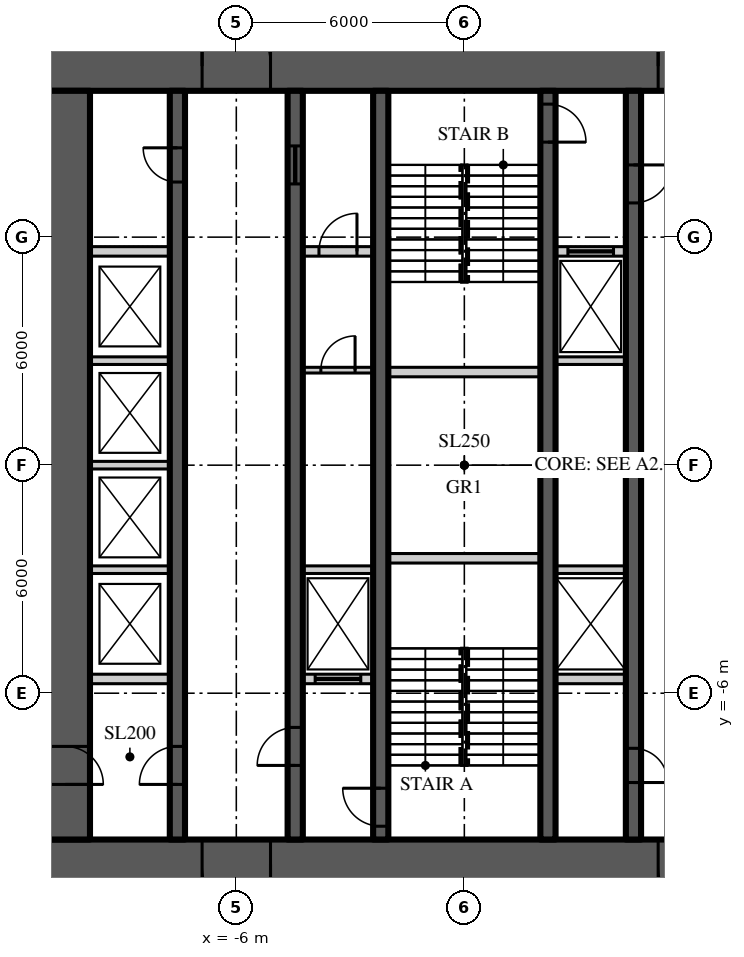
"""IFC4 building model, lengths in metres.
Left out: names, types, materials, properties, quantities, classifications, styles, units other than length and angle.
Written with IfcOpenShell. Run it as: python <this file> out.ifc"""

import sys

from ifc_helpers import new_model, si_unit, direction, frame, frame_2d, origin, place, context, subcontext, project, spatial, rectangle, extrude, element, fill, save


model = new_model("IFC4")
c1 = context("Model", 3, precision=1e-05, world=origin(), true_north=direction((0.0, 1.0)))
c2 = subcontext(c1, "Body", "Model", "MODEL_VIEW")
j1 = project(units=[si_unit("LENGTHUNIT", "METRE"), si_unit("PLANEANGLEUNIT", "RADIAN")], contexts=[c1])
p1 = place(None, origin())
s1 = spatial("IfcSite", under=j1, at=p1, CompositionType="ELEMENT")
p2 = place(p1, origin())
s2 = spatial("IfcBuilding", under=s1, at=p2, CompositionType="ELEMENT")
p3 = place(p2, frame((0.0, 0.0, 7.0)))
s3 = spatial("IfcBuildingStorey", under=s2, at=p3, CompositionType="ELEMENT", Elevation=7.0)
p4 = place(p3, frame((-11.15, 10.5, 0.0), z_axis=(0.0, 0.0, 1.0), x_axis=(1.0, 0.0, 0.0)))
e1 = element("IfcWall", 1, at=p4, inside=s3, PredefinedType="SHEAR", context=c2, shape_type="SweptSolid", body=[
    extrude(rectangle(XDim=22.3, YDim=1.3, at=frame_2d((11.15, 0.0))), origin(), (0.0, 0.0, 1.0), 8.0),
])
p5 = place(p4, frame((4.25, 0.0, 0.0)))
e2 = element("IfcOpeningElement", 2, at=p5, cuts=e1, PredefinedType="OPENING", context=c2, shape_type="SweptSolid", body=[
    extrude(rectangle(XDim=1.8, YDim=2.2, at=frame_2d((0.9, 1.1))), frame((0.0, 0.66, 0.0), z_axis=(0.0, -1.0, 0.0), x_axis=(1.0, 0.0, 0.0)), (0.0, 0.0, 1.0), 1.32),
])
p6 = place(p4, frame((16.25, 0.0, 0.0)))
e3 = element("IfcOpeningElement", 3, at=p6, cuts=e1, PredefinedType="OPENING", context=c2, shape_type="SweptSolid", body=[
    extrude(rectangle(XDim=1.8, YDim=2.2, at=frame_2d((0.9, 1.1))), frame((0.0, 0.66, 0.0), z_axis=(0.0, -1.0, 0.0), x_axis=(1.0, 0.0, 0.0)), (0.0, 0.0, 1.0), 1.32),
])
p7 = place(p3, frame((11.15, -10.5, 0.0), z_axis=(0.0, 0.0, 1.0), x_axis=(-1.0, 0.0, 0.0)))
e4 = element("IfcWall", 4, at=p7, inside=s3, PredefinedType="SHEAR", context=c2, shape_type="SweptSolid", body=[
    extrude(rectangle(XDim=22.3, YDim=1.3, at=frame_2d((11.15, 0.0))), origin(), (0.0, 0.0, 1.0), 8.0),
])
p8 = place(p7, frame((16.25, 0.0, 0.0)))
e5 = element("IfcOpeningElement", 5, at=p8, cuts=e4, PredefinedType="OPENING", context=c2, shape_type="SweptSolid", body=[
    extrude(rectangle(XDim=1.8, YDim=2.2, at=frame_2d((0.9, 1.1))), frame((0.0, 0.66, 0.0), z_axis=(0.0, -1.0, 0.0), x_axis=(1.0, 0.0, 0.0)), (0.0, 0.0, 1.0), 1.32),
])
p9 = place(p7, frame((4.25, 0.0, 0.0)))
e6 = element("IfcOpeningElement", 6, at=p9, cuts=e4, PredefinedType="OPENING", context=c2, shape_type="SweptSolid", body=[
    extrude(rectangle(XDim=1.8, YDim=2.2, at=frame_2d((0.9, 1.1))), frame((0.0, 0.66, 0.0), z_axis=(0.0, -1.0, 0.0), x_axis=(1.0, 0.0, 0.0)), (0.0, 0.0, 1.0), 1.32),
])
p10 = place(p3, frame((-10.5, 9.85, 0.0), z_axis=(0.0, 0.0, 1.0), x_axis=(0.0, -1.0, 0.0)))
e7 = element("IfcWall", 7, at=p10, inside=s3, PredefinedType="SHEAR", context=c2, shape_type="SweptSolid", body=[
    extrude(rectangle(XDim=19.7, YDim=1.3, at=frame_2d((9.85, 0.0))), origin(), (0.0, 0.0, 1.0), 8.0),
])
p11 = place(p10, frame((17.25, 0.0, 0.0)))
e8 = element("IfcOpeningElement", 8, at=p11, cuts=e7, PredefinedType="OPENING", context=c2, shape_type="SweptSolid", body=[
    extrude(rectangle(XDim=1.0, YDim=2.2, at=frame_2d((0.5, 1.1))), frame((0.0, 0.66, 0.0), z_axis=(0.0, -1.0, 0.0), x_axis=(1.0, 0.0, 0.0)), (0.0, 0.0, 1.0), 1.32),
])
p12 = place(p3, frame((-7.55, -9.85, 0.0), z_axis=(0.0, 0.0, 1.0), x_axis=(0.0, 1.0, 0.0)))
e9 = element("IfcWall", 9, at=p12, inside=s3, PredefinedType="SHEAR", context=c2, shape_type="SweptSolid", body=[
    extrude(rectangle(XDim=19.7, YDim=0.4, at=frame_2d((9.85, 0.0))), origin(), (0.0, 0.0, 1.0), 8.0),
])
p13 = place(p12, frame((1.45, 0.0, 0.0)))
e10 = element("IfcOpeningElement", 10, at=p13, cuts=e9, PredefinedType="OPENING", context=c2, shape_type="SweptSolid", body=[
    extrude(rectangle(XDim=1.0, YDim=2.2, at=frame_2d((0.5, 1.1))), frame((0.0, 0.21, 0.0), z_axis=(0.0, -1.0, 0.0), x_axis=(1.0, 0.0, 0.0)), (0.0, 0.0, 1.0), 0.42),
])
p14 = place(p12, frame((17.3, 0.0, 0.0)))
e11 = element("IfcOpeningElement", 11, at=p14, cuts=e9, PredefinedType="OPENING", context=c2, shape_type="SweptSolid", body=[
    extrude(rectangle(XDim=0.9, YDim=2.1, at=frame_2d((0.45, 1.05))), frame((0.0, 0.21, 0.0), z_axis=(0.0, -1.0, 0.0), x_axis=(1.0, 0.0, 0.0)), (0.0, 0.0, 1.0), 0.42),
])
p15 = place(p3, frame((-4.45, -9.85, 0.0), z_axis=(0.0, 0.0, 1.0), x_axis=(0.0, 1.0, 0.0)))
e12 = element("IfcWall", 12, at=p15, inside=s3, PredefinedType="SHEAR", context=c2, shape_type="SweptSolid", body=[
    extrude(rectangle(XDim=19.7, YDim=0.4, at=frame_2d((9.85, 0.0))), origin(), (0.0, 0.0, 1.0), 8.0),
])
p16 = place(p15, frame((1.95, 0.0, 0.0)))
e13 = element("IfcOpeningElement", 13, at=p16, cuts=e12, PredefinedType="OPENING", context=c2, shape_type="SweptSolid", body=[
    extrude(rectangle(XDim=1.0, YDim=2.2, at=frame_2d((0.5, 1.1))), frame((0.0, 0.21, 0.0), z_axis=(0.0, -1.0, 0.0), x_axis=(1.0, 0.0, 0.0)), (0.0, 0.0, 1.0), 0.42),
])
p17 = place(p15, frame((17.25, 0.0, 0.0)))
e14 = element("IfcOpeningElement", 14, at=p17, cuts=e12, PredefinedType="OPENING", context=c2, shape_type="SweptSolid", body=[
    extrude(rectangle(XDim=1.0, YDim=2.1, at=frame_2d((0.5, 1.05))), frame((0.0, 0.21, 0.0), z_axis=(0.0, -1.0, 0.0), x_axis=(1.0, 0.0, 0.0)), (0.0, 0.0, 1.0), 0.42),
])
p18 = place(p3, frame((4.45, 9.85, 0.0), z_axis=(0.0, 0.0, 1.0), x_axis=(0.0, -1.0, 0.0)))
e15 = element("IfcWall", 15, at=p18, inside=s3, PredefinedType="SHEAR", context=c2, shape_type="SweptSolid", body=[
    extrude(rectangle(XDim=19.7, YDim=0.4, at=frame_2d((9.85, 0.0))), origin(), (0.0, 0.0, 1.0), 8.0),
])
p19 = place(p18, frame((1.95, 0.0, 0.0)))
e16 = element("IfcOpeningElement", 16, at=p19, cuts=e15, PredefinedType="OPENING", context=c2, shape_type="SweptSolid", body=[
    extrude(rectangle(XDim=1.0, YDim=2.2, at=frame_2d((0.5, 1.1))), frame((0.0, 0.21, 0.0), z_axis=(0.0, -1.0, 0.0), x_axis=(1.0, 0.0, 0.0)), (0.0, 0.0, 1.0), 0.42),
])
p20 = place(p18, frame((17.3, 0.0, 0.0)))
e17 = element("IfcOpeningElement", 17, at=p20, cuts=e15, PredefinedType="OPENING", context=c2, shape_type="SweptSolid", body=[
    extrude(rectangle(XDim=0.9, YDim=2.1, at=frame_2d((0.45, 1.05))), frame((0.0, 0.21, 0.0), z_axis=(0.0, -1.0, 0.0), x_axis=(1.0, 0.0, 0.0)), (0.0, 0.0, 1.0), 0.42),
])
p21 = place(p3, frame((-2.2, -9.85, 0.0), z_axis=(0.0, 0.0, 1.0), x_axis=(0.0, 1.0, 0.0)))
e18 = element("IfcWall", 18, at=p21, inside=s3, PredefinedType="SHEAR", context=c2, shape_type="SweptSolid", body=[
    extrude(rectangle(XDim=19.7, YDim=0.4, at=frame_2d((9.85, 0.0))), origin(), (0.0, 0.0, 1.0), 8.0),
])
p22 = place(p21, frame((0.35, 0.0, 0.0)))
e19 = element("IfcOpeningElement", 19, at=p22, cuts=e18, PredefinedType="OPENING", context=c2, shape_type="SweptSolid", body=[
    extrude(rectangle(XDim=1.0, YDim=2.2, at=frame_2d((0.5, 1.1))), frame((0.0, 0.21, 0.0), z_axis=(0.0, -1.0, 0.0), x_axis=(1.0, 0.0, 0.0)), (0.0, 0.0, 1.0), 0.42),
])
p23 = place(p3, frame((2.2, 9.85, 0.0), z_axis=(0.0, 0.0, 1.0), x_axis=(0.0, -1.0, 0.0)))
e20 = element("IfcWall", 20, at=p23, inside=s3, PredefinedType="SHEAR", context=c2, shape_type="SweptSolid", body=[
    extrude(rectangle(XDim=19.7, YDim=0.4, at=frame_2d((9.85, 0.0))), origin(), (0.0, 0.0, 1.0), 8.0),
])
p24 = place(p23, frame((0.35, 0.0, 0.0)))
e21 = element("IfcOpeningElement", 21, at=p24, cuts=e20, PredefinedType="OPENING", context=c2, shape_type="SweptSolid", body=[
    extrude(rectangle(XDim=1.0, YDim=2.2, at=frame_2d((0.5, 1.1))), frame((0.0, 0.21, 0.0), z_axis=(0.0, -1.0, 0.0), x_axis=(1.0, 0.0, 0.0)), (0.0, 0.0, 1.0), 0.42),
])
p25 = place(p3, frame((-9.85, 5.625, 0.0), z_axis=(0.0, 0.0, 1.0), x_axis=(1.0, 0.0, 0.0)))
e22 = element("IfcWall", 22, at=p25, inside=s3, PredefinedType="SOLIDWALL", context=c2, shape_type="SweptSolid", body=[
    extrude(rectangle(XDim=2.1, YDim=0.25, at=frame_2d((1.05, 0.0))), origin(), (0.0, 0.0, 1.0), 7.8),
])
p26 = place(p3, frame((-4.25, 5.625, 0.0), z_axis=(0.0, 0.0, 1.0), x_axis=(1.0, 0.0, 0.0)))
e23 = element("IfcWall", 23, at=p26, inside=s3, PredefinedType="SOLIDWALL", context=c2, shape_type="SweptSolid", body=[
    extrude(rectangle(XDim=1.85, YDim=0.25, at=frame_2d((0.925, 0.0))), origin(), (0.0, 0.0, 1.0), 7.8),
])
p27 = place(p26, frame((0.425, 0.0, 0.0)))
e24 = element("IfcOpeningElement", 24, at=p27, cuts=e23, PredefinedType="OPENING", context=c2, shape_type="SweptSolid", body=[
    extrude(rectangle(XDim=1.0, YDim=2.2, at=frame_2d((0.5, 1.1))), frame((0.0, 0.135, 0.0), z_axis=(0.0, -1.0, 0.0), x_axis=(1.0, 0.0, 0.0)), (0.0, 0.0, 1.0), 0.27),
])
p28 = place(p3, frame((2.4, 5.625, 0.0), z_axis=(0.0, 0.0, 1.0), x_axis=(1.0, 0.0, 0.0)))
e25 = element("IfcWall", 25, at=p28, inside=s3, PredefinedType="SOLIDWALL", context=c2, shape_type="SweptSolid", body=[
    extrude(rectangle(XDim=1.85, YDim=0.25, at=frame_2d((0.925, 0.0))), origin(), (0.0, 0.0, 1.0), 7.8),
])
p29 = place(p28, frame((0.325, 0.0, 0.0)))
e26 = element("IfcOpeningElement", 26, at=p29, cuts=e25, PredefinedType="OPENING", context=c2, shape_type="SweptSolid", body=[
    extrude(rectangle(XDim=1.2, YDim=2.2, at=frame_2d((0.6, 1.1))), frame((0.0, 0.135, 0.0), z_axis=(0.0, -1.0, 0.0), x_axis=(1.0, 0.0, 0.0)), (0.0, 0.0, 1.0), 0.27),
])
p30 = place(p3, frame((-9.85, -5.625, 0.0), z_axis=(0.0, 0.0, 1.0), x_axis=(1.0, 0.0, 0.0)))
e27 = element("IfcWall", 27, at=p30, inside=s3, PredefinedType="SOLIDWALL", context=c2, shape_type="SweptSolid", body=[
    extrude(rectangle(XDim=2.1, YDim=0.25, at=frame_2d((1.05, 0.0))), origin(), (0.0, 0.0, 1.0), 7.8),
])
p31 = place(p3, frame((-4.25, -5.625, 0.0), z_axis=(0.0, 0.0, 1.0), x_axis=(1.0, 0.0, 0.0)))
e28 = element("IfcWall", 28, at=p31, inside=s3, PredefinedType="SOLIDWALL", context=c2, shape_type="SweptSolid", body=[
    extrude(rectangle(XDim=1.85, YDim=0.25, at=frame_2d((0.925, 0.0))), origin(), (0.0, 0.0, 1.0), 7.8),
])
p32 = place(p31, frame((0.325, 0.0, 0.0)))
e29 = element("IfcOpeningElement", 29, at=p32, cuts=e28, PredefinedType="OPENING", context=c2, shape_type="SweptSolid", body=[
    extrude(rectangle(XDim=1.2, YDim=2.2, at=frame_2d((0.6, 1.1))), frame((0.0, 0.135, 0.0), z_axis=(0.0, -1.0, 0.0), x_axis=(1.0, 0.0, 0.0)), (0.0, 0.0, 1.0), 0.27),
])
p33 = place(p3, frame((2.4, -5.625, 0.0), z_axis=(0.0, 0.0, 1.0), x_axis=(1.0, 0.0, 0.0)))
e30 = element("IfcWall", 30, at=p33, inside=s3, PredefinedType="SOLIDWALL", context=c2, shape_type="SweptSolid", body=[
    extrude(rectangle(XDim=1.85, YDim=0.25, at=frame_2d((0.925, 0.0))), origin(), (0.0, 0.0, 1.0), 7.8),
])
for number, where, z_axis, x_axis in (
    (31, (-2.0, -2.45, 0.0), (0.0, 0.0, 1.0), (1.0, 0.0, 0.0)),
    (32, (-2.0, 2.45, 0.0), (0.0, 0.0, 1.0), (1.0, 0.0, 0.0)),
):
    element("IfcWall", number, at=place(p3, frame(where, z_axis=z_axis, x_axis=x_axis)), inside=s3, PredefinedType="SOLIDWALL", context=c2, shape_type="SweptSolid", body=[
        extrude(rectangle(XDim=4.0, YDim=0.25, at=frame_2d((2.0, 0.0))), origin(), (0.0, 0.0, 1.0), 7.8),
    ])
p34 = place(p3, frame((-9.85, -2.75, 0.0), z_axis=(0.0, 0.0, 1.0), x_axis=(1.0, 0.0, 0.0)))
e33 = element("IfcWall", 33, at=p34, inside=s3, PredefinedType="SOLIDWALL", context=c2, shape_type="SweptSolid", body=[
    extrude(rectangle(XDim=2.1, YDim=0.2, at=frame_2d((1.05, 0.0))), origin(), (0.0, 0.0, 1.0), 7.8),
])
for number, where, z_axis, x_axis in (
    (34, (-4.25, -2.75, 0.0), (0.0, 0.0, 1.0), (1.0, 0.0, 0.0)),
    (35, (2.4, -2.75, 0.0), (0.0, 0.0, 1.0), (1.0, 0.0, 0.0)),
):
    element("IfcWall", number, at=place(p3, frame(where, z_axis=z_axis, x_axis=x_axis)), inside=s3, PredefinedType="SOLIDWALL", context=c2, shape_type="SweptSolid", body=[
        extrude(rectangle(XDim=1.85, YDim=0.2, at=frame_2d((0.925, 0.0))), origin(), (0.0, 0.0, 1.0), 7.8),
    ])
for number, where, z_axis, x_axis in (
    (36, (-9.85, 0.0, 0.0), (0.0, 0.0, 1.0), (1.0, 0.0, 0.0)),
    (37, (-9.85, 2.75, 0.0), (0.0, 0.0, 1.0), (1.0, 0.0, 0.0)),
):
    element("IfcWall", number, at=place(p3, frame(where, z_axis=z_axis, x_axis=x_axis)), inside=s3, PredefinedType="SOLIDWALL", context=c2, shape_type="SweptSolid", body=[
        extrude(rectangle(XDim=2.1, YDim=0.2, at=frame_2d((1.05, 0.0))), origin(), (0.0, 0.0, 1.0), 7.8),
    ])
p35 = place(p3, frame((2.4, 2.75, 0.0), z_axis=(0.0, 0.0, 1.0), x_axis=(1.0, 0.0, 0.0)))
e38 = element("IfcWall", 38, at=p35, inside=s3, PredefinedType="SOLIDWALL", context=c2, shape_type="SweptSolid", body=[
    extrude(rectangle(XDim=1.85, YDim=0.2, at=frame_2d((0.925, 0.0))), origin(), (0.0, 0.0, 1.0), 7.8),
])
p36 = place(p3, frame((-4.25, 2.5, 0.0), z_axis=(0.0, 0.0, 1.0), x_axis=(1.0, 0.0, 0.0)))
e39 = element("IfcWall", 39, at=p36, inside=s3, PredefinedType="SOLIDWALL", context=c2, shape_type="SweptSolid", body=[
    extrude(rectangle(XDim=1.85, YDim=0.15, at=frame_2d((0.925, 0.0))), origin(), (0.0, 0.0, 1.0), 7.75),
])
p37 = place(p36, frame((0.475, 0.0, 0.0)))
e40 = element("IfcOpeningElement", 40, at=p37, cuts=e39, PredefinedType="OPENING", context=c2, shape_type="SweptSolid", body=[
    extrude(rectangle(XDim=0.9, YDim=2.1, at=frame_2d((0.45, 1.05))), frame((0.0, 0.085, 0.0), z_axis=(0.0, -1.0, 0.0), x_axis=(1.0, 0.0, 0.0)), (0.0, 0.0, 1.0), 0.17),
])
p38 = place(p5, origin())
e41 = element("IfcDoor", 41, at=p38, inside=s3, OperationType="DOUBLE_DOOR_DOUBLE_SWING", PredefinedType="DOOR", context=c2, shape_type="SweptSolid", body=[
    extrude(rectangle(XDim=1.8, YDim=2.2, at=frame_2d((0.9, 1.1))), frame((0.0, 0.025, 0.0), z_axis=(0.0, -1.0, 0.0), x_axis=(1.0, 0.0, 0.0)), (0.0, 0.0, 1.0), 0.05),
])
fill(e2, e41)
p39 = place(p8, origin())
e42 = element("IfcDoor", 42, at=p39, inside=s3, OperationType="DOUBLE_DOOR_DOUBLE_SWING", PredefinedType="DOOR", context=c2, shape_type="SweptSolid", body=[
    extrude(rectangle(XDim=1.8, YDim=2.2, at=frame_2d((0.9, 1.1))), frame((0.0, 0.025, 0.0), z_axis=(0.0, -1.0, 0.0), x_axis=(1.0, 0.0, 0.0)), (0.0, 0.0, 1.0), 0.05),
])
fill(e5, e42)
p40 = place(p6, origin())
e43 = element("IfcDoor", 43, at=p40, inside=s3, OperationType="DOUBLE_DOOR_DOUBLE_SWING", PredefinedType="DOOR", context=c2, shape_type="SweptSolid", body=[
    extrude(rectangle(XDim=1.8, YDim=2.2, at=frame_2d((0.9, 1.1))), frame((0.0, 0.025, 0.0), z_axis=(0.0, -1.0, 0.0), x_axis=(1.0, 0.0, 0.0)), (0.0, 0.0, 1.0), 0.05),
])
fill(e3, e43)
p41 = place(p9, origin())
e44 = element("IfcDoor", 44, at=p41, inside=s3, OperationType="DOUBLE_DOOR_DOUBLE_SWING", PredefinedType="DOOR", context=c2, shape_type="SweptSolid", body=[
    extrude(rectangle(XDim=1.8, YDim=2.2, at=frame_2d((0.9, 1.1))), frame((0.0, 0.025, 0.0), z_axis=(0.0, -1.0, 0.0), x_axis=(1.0, 0.0, 0.0)), (0.0, 0.0, 1.0), 0.05),
])
fill(e6, e44)
p42 = place(p13, origin())
e45 = element("IfcDoor", 45, at=p42, inside=s3, OperationType="SINGLE_SWING_LEFT", PredefinedType="DOOR", context=c2, shape_type="SweptSolid", body=[
    extrude(rectangle(XDim=1.0, YDim=2.2, at=frame_2d((0.5, 1.1))), frame((0.0, 0.025, 0.0), z_axis=(0.0, -1.0, 0.0), x_axis=(1.0, 0.0, 0.0)), (0.0, 0.0, 1.0), 0.05),
])
fill(e10, e45)
p43 = place(p11, origin())
e46 = element("IfcDoor", 46, at=p43, inside=s3, OperationType="SINGLE_SWING_RIGHT", PredefinedType="DOOR", context=c2, shape_type="SweptSolid", body=[
    extrude(rectangle(XDim=1.0, YDim=2.2, at=frame_2d((0.5, 1.1))), frame((0.0, 0.025, 0.0), z_axis=(0.0, -1.0, 0.0), x_axis=(1.0, 0.0, 0.0)), (0.0, 0.0, 1.0), 0.05),
])
fill(e8, e46)
p44 = place(p16, origin())
e47 = element("IfcDoor", 47, at=p44, inside=s3, OperationType="SINGLE_SWING_LEFT", PredefinedType="DOOR", context=c2, shape_type="SweptSolid", body=[
    extrude(rectangle(XDim=1.0, YDim=2.2, at=frame_2d((0.5, 1.1))), frame((0.0, 0.025, 0.0), z_axis=(0.0, -1.0, 0.0), x_axis=(1.0, 0.0, 0.0)), (0.0, 0.0, 1.0), 0.05),
])
fill(e13, e47)
p45 = place(p22, origin())
e48 = element("IfcDoor", 48, at=p45, inside=s3, OperationType="SINGLE_SWING_RIGHT", PredefinedType="DOOR", context=c2, shape_type="SweptSolid", body=[
    extrude(rectangle(XDim=1.0, YDim=2.2, at=frame_2d((0.5, 1.1))), frame((0.0, 0.025, 0.0), z_axis=(0.0, -1.0, 0.0), x_axis=(1.0, 0.0, 0.0)), (0.0, 0.0, 1.0), 0.05),
])
fill(e19, e48)
p46 = place(p19, origin())
e49 = element("IfcDoor", 49, at=p46, inside=s3, OperationType="SINGLE_SWING_LEFT", PredefinedType="DOOR", context=c2, shape_type="SweptSolid", body=[
    extrude(rectangle(XDim=1.0, YDim=2.2, at=frame_2d((0.5, 1.1))), frame((0.0, 0.025, 0.0), z_axis=(0.0, -1.0, 0.0), x_axis=(1.0, 0.0, 0.0)), (0.0, 0.0, 1.0), 0.05),
])
fill(e16, e49)
p47 = place(p24, origin())
e50 = element("IfcDoor", 50, at=p47, inside=s3, OperationType="SINGLE_SWING_RIGHT", PredefinedType="DOOR", context=c2, shape_type="SweptSolid", body=[
    extrude(rectangle(XDim=1.0, YDim=2.2, at=frame_2d((0.5, 1.1))), frame((0.0, 0.025, 0.0), z_axis=(0.0, -1.0, 0.0), x_axis=(1.0, 0.0, 0.0)), (0.0, 0.0, 1.0), 0.05),
])
fill(e21, e50)
p48 = place(p14, origin())
e51 = element("IfcDoor", 51, at=p48, inside=s3, OperationType="SINGLE_SWING_RIGHT", PredefinedType="DOOR", context=c2, shape_type="SweptSolid", body=[
    extrude(rectangle(XDim=0.9, YDim=2.1, at=frame_2d((0.45, 1.05))), frame((0.0, 0.025, 0.0), z_axis=(0.0, -1.0, 0.0), x_axis=(1.0, 0.0, 0.0)), (0.0, 0.0, 1.0), 0.05),
])
fill(e11, e51)
p49 = place(p17, origin())
e52 = element("IfcDoor", 52, at=p49, inside=s3, OperationType="SLIDING_TO_LEFT", PredefinedType="DOOR", context=c2, shape_type="SweptSolid", body=[
    extrude(rectangle(XDim=1.0, YDim=2.1, at=frame_2d((0.5, 1.05))), frame((0.0, 0.025, 0.0), z_axis=(0.0, -1.0, 0.0), x_axis=(1.0, 0.0, 0.0)), (0.0, 0.0, 1.0), 0.05),
])
fill(e14, e52)
p50 = place(p20, origin())
e53 = element("IfcDoor", 53, at=p50, inside=s3, OperationType="SINGLE_SWING_RIGHT", PredefinedType="DOOR", context=c2, shape_type="SweptSolid", body=[
    extrude(rectangle(XDim=0.9, YDim=2.1, at=frame_2d((0.45, 1.05))), frame((0.0, 0.025, 0.0), z_axis=(0.0, -1.0, 0.0), x_axis=(1.0, 0.0, 0.0)), (0.0, 0.0, 1.0), 0.05),
])
fill(e17, e53)
p51 = place(p32, origin())
e54 = element("IfcDoor", 54, at=p51, inside=s3, OperationType="SLIDING_TO_LEFT", PredefinedType="DOOR", context=c2, shape_type="SweptSolid", body=[
    extrude(rectangle(XDim=1.2, YDim=2.2, at=frame_2d((0.6, 1.1))), frame((0.0, 0.025, 0.0), z_axis=(0.0, -1.0, 0.0), x_axis=(1.0, 0.0, 0.0)), (0.0, 0.0, 1.0), 0.05),
])
fill(e29, e54)
p52 = place(p29, origin())
e55 = element("IfcDoor", 55, at=p52, inside=s3, OperationType="SLIDING_TO_LEFT", PredefinedType="DOOR", context=c2, shape_type="SweptSolid", body=[
    extrude(rectangle(XDim=1.2, YDim=2.2, at=frame_2d((0.6, 1.1))), frame((0.0, 0.025, 0.0), z_axis=(0.0, -1.0, 0.0), x_axis=(1.0, 0.0, 0.0)), (0.0, 0.0, 1.0), 0.05),
])
fill(e26, e55)
p53 = place(p37, origin())
e56 = element("IfcDoor", 56, at=p53, inside=s3, OperationType="SINGLE_SWING_RIGHT", PredefinedType="DOOR", context=c2, shape_type="SweptSolid", body=[
    extrude(rectangle(XDim=0.9, YDim=2.1, at=frame_2d((0.45, 1.05))), frame((0.0, 0.025, 0.0), z_axis=(0.0, -1.0, 0.0), x_axis=(1.0, 0.0, 0.0)), (0.0, 0.0, 1.0), 0.05),
])
fill(e40, e56)
p54 = place(p27, origin())
e57 = element("IfcDoor", 57, at=p54, inside=s3, OperationType="SINGLE_SWING_RIGHT", PredefinedType="DOOR", context=c2, shape_type="SweptSolid", body=[
    extrude(rectangle(XDim=1.0, YDim=2.2, at=frame_2d((0.5, 1.1))), frame((0.0, 0.025, 0.0), z_axis=(0.0, -1.0, 0.0), x_axis=(1.0, 0.0, 0.0)), (0.0, 0.0, 1.0), 0.05),
])
fill(e24, e57)
save(model, sys.argv[1])
